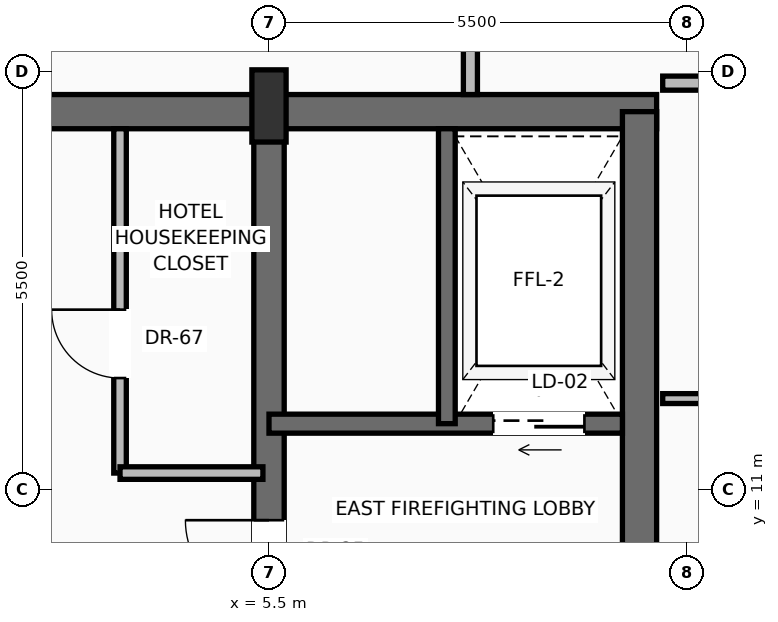
"""IFC4 building model, lengths in metres.
Left out: names, types, materials, properties, quantities, classifications, styles, units other than length and angle.
Written with IfcOpenShell. Run it as: python <this file> out.ifc"""

import sys

from ifc_helpers import new_model, si_unit, direction, frame, frame_2d, origin, origin_2d, place, context, subcontext, project, spatial, rectangle, extrude, source, transform, mapped, element, fill, save


model = new_model("IFC4")
c1 = context("Model", 3, precision=1e-05, world=origin(), true_north=direction((0.0, 1.0)))
c2 = subcontext(c1, "Body", "Model", "MODEL_VIEW")
j1 = project(units=[si_unit("LENGTHUNIT", "METRE"), si_unit("PLANEANGLEUNIT", "RADIAN")], contexts=[c1])
p1 = place(None, origin())
s1 = spatial("IfcSite", under=j1, at=p1, CompositionType="ELEMENT")
p2 = place(p1, origin())
s2 = spatial("IfcBuilding", under=s1, at=p2, CompositionType="ELEMENT")
p3 = place(p2, frame((0.0, 0.0, 297.15)))
s3 = spatial("IfcBuildingStorey", under=s2, at=p3, CompositionType="ELEMENT", Elevation=297.15)
p4 = place(p3, frame((-10.6, 15.975, 0.0), z_axis=(0.0, 0.0, 1.0), x_axis=(1.0, 0.0, 0.0)))
e1 = element("IfcWall", 1, at=p4, inside=s3, PredefinedType="SHEAR", context=c2, shape_type="SweptSolid", body=[
    extrude(rectangle(XDim=21.2, YDim=0.45, at=frame_2d((10.6, 0.0))), origin(), (0.0, 0.0, 1.0), 3.24),
])
p5 = place(p4, frame((3.17, 0.0, 0.0)))
e2 = element("IfcOpeningElement", 2, at=p5, cuts=e1, PredefinedType="OPENING", context=c2, shape_type="SweptSolid", body=[
    extrude(rectangle(XDim=1.3, YDim=2.3, at=frame_2d((0.65, 1.15))), frame((0.0, 0.235, 0.0), z_axis=(0.0, -1.0, 0.0), x_axis=(1.0, 0.0, 0.0)), (0.0, 0.0, 1.0), 0.47),
])
p6 = place(p4, frame((9.6, 0.0, 0.0)))
e3 = element("IfcOpeningElement", 3, at=p6, cuts=e1, PredefinedType="OPENING", context=c2, shape_type="SweptSolid", body=[
    extrude(rectangle(XDim=2.0, YDim=2.4, at=frame_2d((1.0, 1.2))), frame((0.0, 0.235, 0.0), z_axis=(0.0, -1.0, 0.0), x_axis=(1.0, 0.0, 0.0)), (0.0, 0.0, 1.0), 0.47),
])
p7 = place(p3, frame((10.375, 0.625, 0.0), z_axis=(0.0, 0.0, 1.0), x_axis=(0.0, 1.0, 0.0)))
e4 = element("IfcWall", 4, at=p7, inside=s3, PredefinedType="SHEAR", context=c2, shape_type="SweptSolid", body=[
    extrude(rectangle(XDim=15.35, YDim=0.45, at=frame_2d((7.675, 0.0))), origin(), (0.0, 0.0, 1.0), 3.24),
])
p8 = place(p3, frame((5.5, 0.625, 0.0), z_axis=(0.0, 0.0, 1.0), x_axis=(0.0, 1.0, 0.0)))
e5 = element("IfcWall", 5, at=p8, inside=s3, PredefinedType="SHEAR", context=c2, shape_type="SweptSolid", body=[
    extrude(rectangle(XDim=15.35, YDim=0.4, at=frame_2d((7.675, 0.0))), origin(), (0.0, 0.0, 1.0), 3.24),
])
p9 = place(p8, frame((8.875, 0.0, 0.0)))
e6 = element("IfcOpeningElement", 6, at=p9, cuts=e5, PredefinedType="OPENING", context=c2, shape_type="SweptSolid", body=[
    extrude(rectangle(XDim=1.1, YDim=2.2, at=frame_2d((0.55, 1.1))), frame((0.0, 0.21, 0.0), z_axis=(0.0, -1.0, 0.0), x_axis=(1.0, 0.0, 0.0)), (0.0, 0.0, 1.0), 0.42),
])
m1 = source(origin(), c2, "Body", "SweptSolid", [
    extrude(rectangle(XDim=0.45, YDim=0.95, at=origin_2d()), origin(), (0.0, 0.0, 1.0), 3.45),
])
p10 = place(p3, frame((5.5, 16.05, 0.0), z_axis=(0.0, 0.0, 1.0), x_axis=(1.0, 0.0, 0.0)))
e7 = element("IfcColumn", 7, at=p10, inside=s3, PredefinedType="PILASTER", context=c2, shape_type="MappedRepresentation", body=[
    mapped(m1, transform((0.0, 0.0, 0.0), scale=1.0)),
])
p11 = place(p3, frame((7.586, 31.561, 0.0), z_axis=(0.0, 0.0, 1.0), x_axis=(0.498604857305, -0.866829392829, 0.0)))
e8 = element("IfcWall", 8, at=p11, inside=s3, PredefinedType="SOLIDWALL", context=c2, shape_type="SweptSolid", body=[
    extrude(rectangle(XDim=20.167, YDim=0.28, at=frame_2d((10.083, 0.0))), origin(), (0.0, 0.0, 1.0), 2.82),
])
p12 = place(p11, frame((4.84, 0.0, 0.0)))
e9 = element("IfcOpeningElement", 9, at=p12, cuts=e8, PredefinedType="OPENING", context=c2, shape_type="SweptSolid", body=[
    extrude(rectangle(XDim=1.6, YDim=2.35, at=frame_2d((0.8, 1.175))), frame((0.0, 0.15, 0.0), z_axis=(0.0, -1.0, 0.0), x_axis=(1.0, 0.0, 0.0)), (0.0, 0.0, 1.0), 0.3),
])
p13 = place(p11, frame((13.714, 0.0, 0.9)))
e10 = element("IfcOpeningElement", 10, at=p13, cuts=e8, PredefinedType="OPENING", context=c2, shape_type="SweptSolid", body=[
    extrude(rectangle(XDim=2.0, YDim=1.75, at=frame_2d((1.0, 0.875))), frame((0.0, 0.15, 0.0), z_axis=(0.0, -1.0, 0.0), x_axis=(1.0, 0.0, 0.0)), (0.0, 0.0, 1.0), 0.3),
])
p14 = place(p3, frame((10.15, 11.87, 0.0), z_axis=(0.0, 0.0, 1.0), x_axis=(-1.0, 0.0, 0.0)))
e11 = element("IfcWall", 11, at=p14, inside=s3, PredefinedType="SOLIDWALL", context=c2, shape_type="SweptSolid", body=[
    extrude(rectangle(XDim=4.65, YDim=0.25, at=frame_2d((2.325, 0.0))), origin(), (0.0, 0.0, 1.0), 3.24),
])
p15 = place(p14, frame((0.5, 0.0, 0.0)))
e12 = element("IfcOpeningElement", 12, at=p15, cuts=e11, PredefinedType="OPENING", context=c2, shape_type="SweptSolid", body=[
    extrude(rectangle(XDim=1.2, YDim=2.25, at=frame_2d((0.6, 1.125))), frame((0.0, 0.135, 0.0), z_axis=(0.0, -1.0, 0.0), x_axis=(1.0, 0.0, 0.0)), (0.0, 0.0, 1.0), 0.27),
])
p16 = place(p3, frame((7.84, 11.87, 0.0), z_axis=(0.0, 0.0, 1.0), x_axis=(0.0, 1.0, 0.0)))
e13 = element("IfcWall", 13, at=p16, inside=s3, PredefinedType="SOLIDWALL", context=c2, shape_type="SweptSolid", body=[
    extrude(rectangle(XDim=3.88, YDim=0.22, at=frame_2d((1.94, 0.0))), origin(), (0.0, 0.0, 1.0), 3.24),
])
p17 = place(p3, frame((3.54, 11.22, 0.0), z_axis=(0.0, 0.0, 1.0), x_axis=(0.0, 1.0, 0.0)))
e14 = element("IfcWall", 14, at=p17, inside=s3, PredefinedType="PARTITIONING", context=c2, shape_type="SweptSolid", body=[
    extrude(rectangle(XDim=4.53, YDim=0.165, at=frame_2d((2.265, 0.0))), origin(), (0.0, 0.0, 1.0), 3.232),
])
p18 = place(p17, frame((1.25, 0.0, 0.0)))
e15 = element("IfcOpeningElement", 15, at=p18, cuts=e14, PredefinedType="OPENING", context=c2, shape_type="SweptSolid", body=[
    extrude(rectangle(XDim=0.9, YDim=2.1, at=frame_2d((0.45, 1.05))), frame((0.0, 0.093, 0.0), z_axis=(0.0, -1.0, 0.0), x_axis=(1.0, 0.0, 0.0)), (0.0, 0.0, 1.0), 0.185),
])
p19 = place(p3, frame((3.54, 11.22, 0.0), z_axis=(0.0, 0.0, 1.0), x_axis=(1.0, 0.0, 0.0)))
e16 = element("IfcWall", 16, at=p19, inside=s3, PredefinedType="PARTITIONING", context=c2, shape_type="SweptSolid", body=[
    extrude(rectangle(XDim=1.88, YDim=0.165, at=frame_2d((0.94, 0.0))), origin(), (0.0, 0.0, 1.0), 3.232),
])
p20 = place(p3, frame((8.15, 16.2, 0.0), z_axis=(0.0, 0.0, 1.0), x_axis=(0.0, 1.0, 0.0)))
e17 = element("IfcWall", 17, at=p20, inside=s3, PredefinedType="PARTITIONING", context=c2, shape_type="SweptSolid", body=[
    extrude(rectangle(XDim=13.6, YDim=0.185, at=frame_2d((6.8, 0.0))), origin(), (0.0, 0.0, 1.0), 3.232),
])
p21 = place(p20, frame((2.853, 0.0, 0.0)))
e18 = element("IfcOpeningElement", 18, at=p21, cuts=e17, PredefinedType="OPENING", context=c2, shape_type="SweptSolid", body=[
    extrude(rectangle(XDim=1.05, YDim=2.25, at=frame_2d((0.525, 1.125))), frame((0.0, 0.103, 0.0), z_axis=(0.0, -1.0, 0.0), x_axis=(1.0, 0.0, 0.0)), (0.0, 0.0, 1.0), 0.205),
])
p22 = place(p20, frame((6.853, 0.0, 0.0)))
e19 = element("IfcOpeningElement", 19, at=p22, cuts=e17, PredefinedType="OPENING", context=c2, shape_type="SweptSolid", body=[
    extrude(rectangle(XDim=1.05, YDim=2.25, at=frame_2d((0.525, 1.125))), frame((0.0, 0.103, 0.0), z_axis=(0.0, -1.0, 0.0), x_axis=(1.0, 0.0, 0.0)), (0.0, 0.0, 1.0), 0.205),
])
p23 = place(p20, frame((11.185, 0.0, 0.0)))
e20 = element("IfcOpeningElement", 20, at=p23, cuts=e17, PredefinedType="OPENING", context=c2, shape_type="SweptSolid", body=[
    extrude(rectangle(XDim=1.05, YDim=2.25, at=frame_2d((0.525, 1.125))), frame((0.0, 0.103, 0.0), z_axis=(0.0, -1.0, 0.0), x_axis=(1.0, 0.0, 0.0)), (0.0, 0.0, 1.0), 0.205),
])
p24 = place(p3, frame((10.68, 16.35, 0.0), z_axis=(0.0, 0.0, 1.0), x_axis=(1.0, 0.0, 0.0)))
e21 = element("IfcWall", 21, at=p24, inside=s3, PredefinedType="PARTITIONING", context=c2, shape_type="SweptSolid", body=[
    extrude(rectangle(XDim=5.806, YDim=0.185, at=frame_2d((2.903, 0.0))), origin(), (0.0, 0.0, 1.0), 3.232),
])
p25 = place(p24, frame((1.609, 0.0, 0.0)))
e22 = element("IfcOpeningElement", 22, at=p25, cuts=e21, PredefinedType="OPENING", context=c2, shape_type="SweptSolid", body=[
    extrude(rectangle(XDim=1.05, YDim=2.25, at=frame_2d((0.525, 1.125))), frame((0.0, 0.103, 0.0), z_axis=(0.0, -1.0, 0.0), x_axis=(1.0, 0.0, 0.0)), (0.0, 0.0, 1.0), 0.205),
])
p26 = place(p3, frame((10.68, 12.2, 0.0), z_axis=(0.0, 0.0, 1.0), x_axis=(1.0, 0.0, 0.0)))
e23 = element("IfcWall", 23, at=p26, inside=s3, PredefinedType="PARTITIONING", context=c2, shape_type="SweptSolid", body=[
    extrude(rectangle(XDim=8.193, YDim=0.13, at=frame_2d((4.096, 0.0))), origin(), (0.0, 0.0, 1.0), 3.232),
])
p27 = place(p26, frame((3.246, 0.0, 0.0)))
e24 = element("IfcOpeningElement", 24, at=p27, cuts=e23, PredefinedType="OPENING", context=c2, shape_type="SweptSolid", body=[
    extrude(rectangle(XDim=0.95, YDim=2.2, at=frame_2d((0.475, 1.1))), frame((0.0, 0.075, 0.0), z_axis=(0.0, -1.0, 0.0), x_axis=(1.0, 0.0, 0.0)), (0.0, 0.0, 1.0), 0.15),
])
m2 = source(origin(), c2, "Body", "SweptSolid", [
    extrude(rectangle(XDim=1.1, YDim=2.2, at=frame_2d((0.55, 1.1))), frame((0.0, 0.025, 0.0), z_axis=(0.0, -1.0, 0.0), x_axis=(1.0, 0.0, 0.0)), (0.0, 0.0, 1.0), 0.05),
])
p28 = place(p9, origin())
e25 = element("IfcDoor", 25, at=p28, inside=s3, OperationType="SINGLE_SWING_RIGHT", PredefinedType="DOOR", context=c2, shape_type="MappedRepresentation", body=[
    mapped(m2, transform((0.0, 0.0, 0.0), scale=1.0)),
])
fill(e6, e25)
m3 = source(origin(), c2, "Body", "SweptSolid", [
    extrude(rectangle(XDim=1.2, YDim=2.25, at=frame_2d((0.6, 1.125))), frame((0.0, 0.025, 0.0), z_axis=(0.0, -1.0, 0.0), x_axis=(1.0, 0.0, 0.0)), (0.0, 0.0, 1.0), 0.05),
])
p29 = place(p15, origin())
e26 = element("IfcDoor", 26, at=p29, inside=s3, OperationType="SLIDING_TO_RIGHT", PredefinedType="DOOR", context=c2, shape_type="MappedRepresentation", body=[
    mapped(m3, transform((0.0, 0.0, 0.0), scale=1.0)),
])
fill(e12, e26)
m4 = source(origin(), c2, "Body", "SweptSolid", [
    extrude(rectangle(XDim=0.9, YDim=2.1, at=frame_2d((0.45, 1.05))), frame((0.0, 0.025, 0.0), z_axis=(0.0, -1.0, 0.0), x_axis=(1.0, 0.0, 0.0)), (0.0, 0.0, 1.0), 0.05),
])
p30 = place(p18, origin())
e27 = element("IfcDoor", 27, at=p30, inside=s3, OperationType="SINGLE_SWING_RIGHT", PredefinedType="DOOR", context=c2, shape_type="MappedRepresentation", body=[
    mapped(m4, transform((0.0, 0.0, 0.0), scale=1.0)),
])
fill(e15, e27)
save(model, sys.argv[1])
